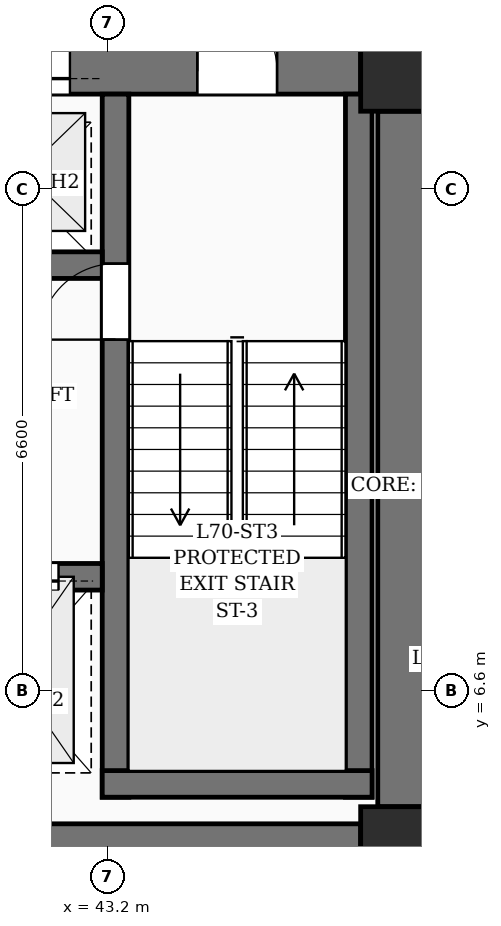
"""IFC4 building model, lengths in metres.
Left out: names, types, materials, properties, quantities, classifications, styles, units other than length and angle.
Written with IfcOpenShell. Run it as: python <this file> out.ifc"""

import sys

from ifc_helpers import new_model, si_unit, direction, frame, frame_2d, origin, origin_2d, place, context, subcontext, project, spatial, rectangle, extrude, element, fill, save


model = new_model("IFC4")
c1 = context("Model", 3, precision=1e-05, world=origin(), true_north=direction((0.0, 1.0)))
c2 = subcontext(c1, "Body", "Model", "MODEL_VIEW")
j1 = project(units=[si_unit("LENGTHUNIT", "METRE"), si_unit("PLANEANGLEUNIT", "RADIAN")], contexts=[c1])
p1 = place(None, origin())
s1 = spatial("IfcSite", under=j1, at=p1, CompositionType="ELEMENT")
p2 = place(p1, origin())
s2 = spatial("IfcBuilding", under=s1, at=p2, CompositionType="ELEMENT")
p3 = place(p2, frame((0.0, 0.0, 270.75)))
s3 = spatial("IfcBuildingStorey", under=s2, at=p3, CompositionType="ELEMENT", Elevation=270.75)
for number, where, z_axis, x_axis in (
    (1, (47.05, 4.55, 0.0), (0.0, 0.0, 1.0), (1.0, 0.0, 0.0)),
    (2, (47.05, 14.75, 0.0), (0.0, 0.0, 1.0), (1.0, 0.0, 0.0)),
):
    element("IfcColumn", number, at=place(p3, frame(where, z_axis=z_axis, x_axis=x_axis)), inside=s3, PredefinedType="COLUMN", context=c2, shape_type="SweptSolid", body=[
        extrude(rectangle(XDim=1.05, YDim=1.05, at=origin_2d()), origin(), (0.0, 0.0, 1.0), 3.75),
    ])
p4 = place(p3, frame((35.675, 4.55, 0.0), z_axis=(0.0, 0.0, 1.0), x_axis=(1.0, 0.0, 0.0)))
e3 = element("IfcWall", 3, at=p4, inside=s3, PredefinedType="SHEAR", context=c2, shape_type="SweptSolid", body=[
    extrude(rectangle(XDim=10.85, YDim=0.6, at=frame_2d((5.425, 0.0))), origin(), (0.0, 0.0, 1.0), 3.75),
])
p5 = place(p3, frame((35.675, 14.75, 0.0), z_axis=(0.0, 0.0, 1.0), x_axis=(1.0, 0.0, 0.0)))
e4 = element("IfcWall", 4, at=p5, inside=s3, PredefinedType="SHEAR", context=c2, shape_type="SweptSolid", body=[
    extrude(rectangle(XDim=10.85, YDim=0.6, at=frame_2d((5.425, 0.0))), origin(), (0.0, 0.0, 1.0), 3.75),
])
p6 = place(p5, frame((1.1, 0.0, 0.0)))
e5 = element("IfcOpeningElement", 5, at=p6, cuts=e4, PredefinedType="OPENING", context=c2, shape_type="SweptSolid", body=[
    extrude(rectangle(XDim=1.05, YDim=2.15, at=frame_2d((0.525, 1.075))), frame((0.0, 0.31, 0.0), z_axis=(0.0, -1.0, 0.0), x_axis=(1.0, 0.0, 0.0)), (0.0, 0.0, 1.0), 0.62),
])
p7 = place(p5, frame((8.7, 0.0, 0.0)))
e6 = element("IfcOpeningElement", 6, at=p7, cuts=e4, PredefinedType="OPENING", context=c2, shape_type="SweptSolid", body=[
    extrude(rectangle(XDim=1.05, YDim=2.15, at=frame_2d((0.525, 1.075))), frame((0.0, 0.31, 0.0), z_axis=(0.0, -1.0, 0.0), x_axis=(1.0, 0.0, 0.0)), (0.0, 0.0, 1.0), 0.62),
])
p8 = place(p5, frame((3.825, 0.0, 0.0)))
e7 = element("IfcOpeningElement", 7, at=p8, cuts=e4, PredefinedType="OPENING", context=c2, shape_type="SweptSolid", body=[
    extrude(rectangle(XDim=1.2, YDim=2.2, at=frame_2d((0.6, 1.1))), frame((0.0, 0.31, 0.0), z_axis=(0.0, -1.0, 0.0), x_axis=(1.0, 0.0, 0.0)), (0.0, 0.0, 1.0), 0.62),
])
p9 = place(p5, frame((5.825, 0.0, 0.0)))
e8 = element("IfcOpeningElement", 8, at=p9, cuts=e4, PredefinedType="OPENING", context=c2, shape_type="SweptSolid", body=[
    extrude(rectangle(XDim=1.2, YDim=2.2, at=frame_2d((0.6, 1.1))), frame((0.0, 0.31, 0.0), z_axis=(0.0, -1.0, 0.0), x_axis=(1.0, 0.0, 0.0)), (0.0, 0.0, 1.0), 0.62),
])
p10 = place(p3, frame((47.05, 5.075, 0.0), z_axis=(0.0, 0.0, 1.0), x_axis=(0.0, 1.0, 0.0)))
e9 = element("IfcWall", 9, at=p10, inside=s3, PredefinedType="SHEAR", context=c2, shape_type="SweptSolid", body=[
    extrude(rectangle(XDim=9.15, YDim=0.6, at=frame_2d((4.575, 0.0))), origin(), (0.0, 0.0, 1.0), 3.75),
])
p11 = place(p3, frame((43.3, 5.2, 0.0), z_axis=(0.0, 0.0, 1.0), x_axis=(0.0, 1.0, 0.0)))
e10 = element("IfcWall", 10, at=p11, inside=s3, PredefinedType="SOLIDWALL", context=c2, shape_type="SweptSolid", body=[
    extrude(rectangle(XDim=9.25, YDim=0.35, at=frame_2d((4.625, 0.0))), origin(), (0.0, 0.0, 1.0), 3.75),
])
p12 = place(p11, frame((6.02, 0.0, 0.0)))
e11 = element("IfcOpeningElement", 11, at=p12, cuts=e10, PredefinedType="OPENING", context=c2, shape_type="SweptSolid", body=[
    extrude(rectangle(XDim=1.0, YDim=2.15, at=frame_2d((0.5, 1.075))), frame((0.0, 0.185, 0.0), z_axis=(0.0, -1.0, 0.0), x_axis=(1.0, 0.0, 0.0)), (0.0, 0.0, 1.0), 0.37),
])
p13 = place(p3, frame((46.5, 5.2, 0.0), z_axis=(0.0, 0.0, 1.0), x_axis=(0.0, 1.0, 0.0)))
e12 = element("IfcWall", 12, at=p13, inside=s3, PredefinedType="SOLIDWALL", context=c2, shape_type="SweptSolid", body=[
    extrude(rectangle(XDim=9.25, YDim=0.35, at=frame_2d((4.625, 0.0))), origin(), (0.0, 0.0, 1.0), 3.75),
])
p14 = place(p3, frame((43.125, 5.375, 0.0), z_axis=(0.0, 0.0, 1.0), x_axis=(1.0, 0.0, 0.0)))
e13 = element("IfcWall", 13, at=p14, inside=s3, PredefinedType="SOLIDWALL", context=c2, shape_type="SweptSolid", body=[
    extrude(rectangle(XDim=3.55, YDim=0.35, at=frame_2d((1.775, 0.0))), origin(), (0.0, 0.0, 1.0), 3.75),
])
p15 = place(p3, frame((40.55, 8.1, 0.0), z_axis=(0.0, 0.0, 1.0), x_axis=(1.0, 0.0, 0.0)))
e14 = element("IfcWall", 14, at=p15, inside=s3, PredefinedType="SOLIDWALL", context=c2, shape_type="SweptSolid", body=[
    extrude(rectangle(XDim=2.575, YDim=0.35, at=frame_2d((1.288, 0.0))), origin(), (0.0, 0.0, 1.0), 3.75),
])
p16 = place(p15, frame((0.7, 0.0, 0.0)))
e15 = element("IfcOpeningElement", 15, at=p16, cuts=e14, PredefinedType="OPENING", context=c2, shape_type="SweptSolid", body=[
    extrude(rectangle(XDim=1.3, YDim=2.25, at=frame_2d((0.65, 1.125))), frame((0.0, 0.185, 0.0), z_axis=(0.0, -1.0, 0.0), x_axis=(1.0, 0.0, 0.0)), (0.0, 0.0, 1.0), 0.37),
])
p17 = place(p3, frame((39.075, 12.2, 0.0), z_axis=(0.0, 0.0, 1.0), x_axis=(1.0, 0.0, 0.0)))
e16 = element("IfcWall", 16, at=p17, inside=s3, PredefinedType="SOLIDWALL", context=c2, shape_type="SweptSolid", body=[
    extrude(rectangle(XDim=4.05, YDim=0.35, at=frame_2d((2.025, 0.0))), origin(), (0.0, 0.0, 1.0), 3.75),
])
p18 = place(p3, frame((53.578, 4.588, 0.0), z_axis=(0.0, 0.0, 1.0), x_axis=(-0.500886683544, 0.86551287122, 0.0)))
e17 = element("IfcWall", 17, at=p18, inside=s3, PredefinedType="PARTITIONING", context=c2, shape_type="SweptSolid", body=[
    extrude(rectangle(XDim=13.447, YDim=0.15, at=frame_2d((6.723, 0.0))), origin(), (0.0, 0.0, 1.0), 2.691),
])
p19 = place(p18, frame((5.637, 0.0, 0.0)))
e18 = element("IfcOpeningElement", 18, at=p19, cuts=e17, PredefinedType="OPENING", context=c2, shape_type="SweptSolid", body=[
    extrude(rectangle(XDim=0.95, YDim=2.2, at=frame_2d((0.475, 1.1))), frame((0.0, 0.085, 0.0), z_axis=(0.0, -1.0, 0.0), x_axis=(1.0, 0.0, 0.0)), (0.0, 0.0, 1.0), 0.17),
])
p20 = place(p7, origin())
e19 = element("IfcDoor", 19, at=p20, inside=s3, OperationType="SINGLE_SWING_LEFT", PredefinedType="DOOR", context=c2, shape_type="SweptSolid", body=[
    extrude(rectangle(XDim=1.05, YDim=2.15, at=frame_2d((0.525, 1.075))), frame((0.0, 0.025, 0.0), z_axis=(0.0, -1.0, 0.0), x_axis=(1.0, 0.0, 0.0)), (0.0, 0.0, 1.0), 0.05),
])
fill(e6, e19)
p21 = place(p12, origin())
e20 = element("IfcDoor", 20, at=p21, inside=s3, OperationType="SINGLE_SWING_LEFT", PredefinedType="DOOR", context=c2, shape_type="SweptSolid", body=[
    extrude(rectangle(XDim=1.0, YDim=2.15, at=frame_2d((0.5, 1.075))), frame((0.0, 0.025, 0.0), z_axis=(0.0, -1.0, 0.0), x_axis=(1.0, 0.0, 0.0)), (0.0, 0.0, 1.0), 0.05),
])
fill(e11, e20)
p22 = place(p16, origin())
e21 = element("IfcDoor", 21, at=p22, inside=s3, OperationType="DOUBLE_DOOR_SLIDING", PredefinedType="DOOR", context=c2, shape_type="SweptSolid", body=[
    extrude(rectangle(XDim=1.3, YDim=2.25, at=frame_2d((0.65, 1.125))), frame((0.0, 0.025, 0.0), z_axis=(0.0, -1.0, 0.0), x_axis=(1.0, 0.0, 0.0)), (0.0, 0.0, 1.0), 0.05),
])
fill(e15, e21)
p23 = place(p9, origin())
e22 = element("IfcDoor", 22, at=p23, inside=s3, OperationType="DOUBLE_DOOR_SLIDING", PredefinedType="DOOR", context=c2, shape_type="SweptSolid", body=[
    extrude(rectangle(XDim=1.2, YDim=2.2, at=frame_2d((0.6, 1.1))), frame((0.0, 0.025, 0.0), z_axis=(0.0, -1.0, 0.0), x_axis=(1.0, 0.0, 0.0)), (0.0, 0.0, 1.0), 0.05),
])
fill(e8, e22)
save(model, sys.argv[1])
